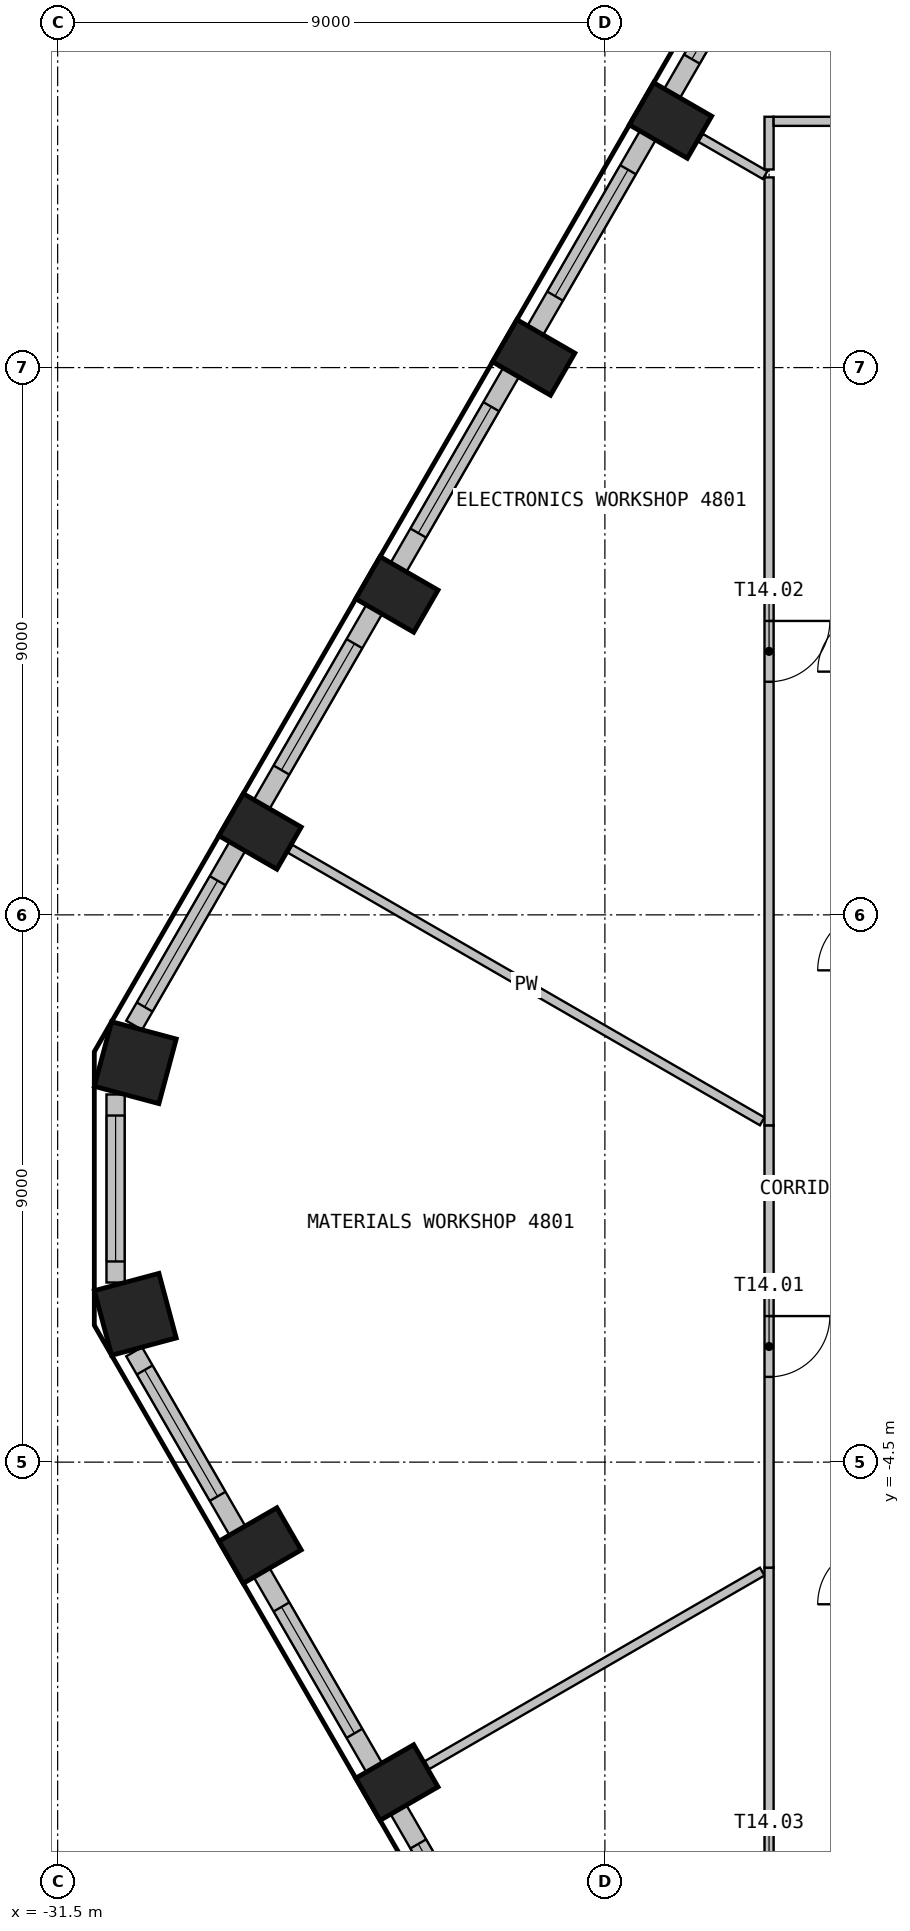
"""IFC4 building model, lengths in metres.
Left out: names, types, materials, properties, quantities, classifications, styles, units other than length and angle.
Written with IfcOpenShell. Run it as: python <this file> out.ifc"""

import sys

from ifc_helpers import new_model, si_unit, direction, frame, frame_2d, origin, origin_2d, place, context, subcontext, project, spatial, rectangle, extrude, element, fill, save


model = new_model("IFC4")
c1 = context("Model", 3, precision=1e-05, world=origin(), true_north=direction((0.0, 1.0)))
c2 = subcontext(c1, "Body", "Model", "MODEL_VIEW")
j1 = project(units=[si_unit("LENGTHUNIT", "METRE"), si_unit("PLANEANGLEUNIT", "RADIAN")], contexts=[c1])
p1 = place(None, origin())
s1 = spatial("IfcSite", under=j1, at=p1, CompositionType="ELEMENT")
p2 = place(p1, origin())
s2 = spatial("IfcBuilding", under=s1, at=p2, CompositionType="ELEMENT")
p3 = place(p2, frame((0.0, 0.0, 195.6)))
s3 = spatial("IfcBuildingStorey", under=s2, at=p3, CompositionType="ELEMENT", Elevation=195.6)
for number, where, z_axis, x_axis in (
    (1, (-21.421, 17.563, 0.0), (0.0, 0.0, 1.0), (-0.5, -0.866, 0.0)),
    (2, (-23.671, 13.666, 0.0), (0.0, 0.0, 1.0), (-0.5, -0.866, 0.0)),
    (3, (-25.921, 9.769, 0.0), (0.0, 0.0, 1.0), (-0.5, -0.866, 0.0)),
    (4, (-28.171, 5.872, 0.0), (0.0, 0.0, 1.0), (-0.5, -0.866, 0.0)),
):
    element("IfcColumn", number, at=place(p3, frame(where, z_axis=z_axis, x_axis=x_axis)), inside=s3, PredefinedType="COLUMN", context=c2, shape_type="SweptSolid", body=[
        extrude(rectangle(XDim=0.8, YDim=1.1, at=origin_2d()), origin(), (0.0, 0.0, 1.0), 3.55),
    ])
for number, where, z_axis, x_axis in (
    (5, (-30.223, 2.07, 0.0), (0.0, 0.0, 1.0), (-0.259, -0.966, 0.0)),
    (6, (-30.223, -2.07, 0.0), (0.0, 0.0, 1.0), (0.259, -0.966, 0.0)),
):
    element("IfcColumn", number, at=place(p3, frame(where, z_axis=z_axis, x_axis=x_axis)), inside=s3, PredefinedType="COLUMN", context=c2, shape_type="SweptSolid", body=[
        extrude(rectangle(XDim=1.1, YDim=1.1, at=origin_2d()), origin(), (0.0, 0.0, 1.0), 3.55),
    ])
for number, where, z_axis, x_axis in (
    (7, (-28.171, -5.872, 0.0), (0.0, 0.0, 1.0), (0.5, -0.866, 0.0)),
    (8, (-25.921, -9.769, 0.0), (0.0, 0.0, 1.0), (0.5, -0.866, 0.0)),
):
    element("IfcColumn", number, at=place(p3, frame(where, z_axis=z_axis, x_axis=x_axis)), inside=s3, PredefinedType="COLUMN", context=c2, shape_type="SweptSolid", body=[
        extrude(rectangle(XDim=0.8, YDim=1.1, at=origin_2d()), origin(), (0.0, 0.0, 1.0), 3.55),
    ])
p4 = place(p3, frame((-19.696, 20.951, 0.0), z_axis=(0.0, 0.0, 1.0), x_axis=(-0.500012868213, -0.866017974191, 0.0)))
e9 = element("IfcWall", 9, at=p4, inside=s3, PredefinedType="SOLIDWALL", context=c2, shape_type="SweptSolid", body=[
    extrude(rectangle(XDim=3.396, YDim=0.3, at=frame_2d((1.698, 0.0))), origin(), (0.0, 0.0, 1.0), 3.55),
])
p5 = place(p4, frame((0.346, 0.0, 0.9)))
e10 = element("IfcOpeningElement", 10, at=p5, cuts=e9, PredefinedType="OPENING", context=c2, shape_type="SweptSolid", body=[
    extrude(rectangle(XDim=2.4, YDim=2.1, at=frame_2d((1.2, 1.05))), frame((0.0, 0.16, 0.0), z_axis=(0.0, -1.0, 0.0), x_axis=(1.0, 0.0, 0.0)), (0.0, 0.0, 1.0), 0.32),
])
p6 = place(p3, frame((-21.794, 17.317, 0.0), z_axis=(0.0, 0.0, 1.0), x_axis=(-0.500029062817, -0.866008623709, 0.0)))
e11 = element("IfcWall", 11, at=p6, inside=s3, PredefinedType="SOLIDWALL", context=c2, shape_type="SweptSolid", body=[
    extrude(rectangle(XDim=3.699, YDim=0.3, at=frame_2d((1.85, 0.0))), origin(), (0.0, 0.0, 1.0), 3.55),
])
p7 = place(p6, frame((0.649, 0.0, 0.9)))
e12 = element("IfcOpeningElement", 12, at=p7, cuts=e11, PredefinedType="OPENING", context=c2, shape_type="SweptSolid", body=[
    extrude(rectangle(XDim=2.4, YDim=2.1, at=frame_2d((1.2, 1.05))), frame((0.0, 0.16, 0.0), z_axis=(0.0, -1.0, 0.0), x_axis=(1.0, 0.0, 0.0)), (0.0, 0.0, 1.0), 0.32),
])
p8 = place(p3, frame((-24.044, 13.419, 0.0), z_axis=(0.0, 0.0, 1.0), x_axis=(-0.500029062817, -0.866008623709, 0.0)))
e13 = element("IfcWall", 13, at=p8, inside=s3, PredefinedType="SOLIDWALL", context=c2, shape_type="SweptSolid", body=[
    extrude(rectangle(XDim=3.699, YDim=0.3, at=frame_2d((1.85, 0.0))), origin(), (0.0, 0.0, 1.0), 3.55),
])
p9 = place(p8, frame((0.649, 0.0, 0.9)))
e14 = element("IfcOpeningElement", 14, at=p9, cuts=e13, PredefinedType="OPENING", context=c2, shape_type="SweptSolid", body=[
    extrude(rectangle(XDim=2.4, YDim=2.1, at=frame_2d((1.2, 1.05))), frame((0.0, 0.16, 0.0), z_axis=(0.0, -1.0, 0.0), x_axis=(1.0, 0.0, 0.0)), (0.0, 0.0, 1.0), 0.32),
])
p10 = place(p3, frame((-26.294, 9.522, 0.0), z_axis=(0.0, 0.0, 1.0), x_axis=(-0.500029062817, -0.866008623709, 0.0)))
e15 = element("IfcWall", 15, at=p10, inside=s3, PredefinedType="SOLIDWALL", context=c2, shape_type="SweptSolid", body=[
    extrude(rectangle(XDim=3.699, YDim=0.3, at=frame_2d((1.85, 0.0))), origin(), (0.0, 0.0, 1.0), 3.55),
])
p11 = place(p10, frame((0.649, 0.0, 0.9)))
e16 = element("IfcOpeningElement", 16, at=p11, cuts=e15, PredefinedType="OPENING", context=c2, shape_type="SweptSolid", body=[
    extrude(rectangle(XDim=2.4, YDim=2.1, at=frame_2d((1.2, 1.05))), frame((0.0, 0.16, 0.0), z_axis=(0.0, -1.0, 0.0), x_axis=(1.0, 0.0, 0.0)), (0.0, 0.0, 1.0), 0.32),
])
p12 = place(p3, frame((-28.544, 5.625, 0.0), z_axis=(0.0, 0.0, 1.0), x_axis=(-0.500012868213, -0.866017974191, 0.0)))
e17 = element("IfcWall", 17, at=p12, inside=s3, PredefinedType="SOLIDWALL", context=c2, shape_type="SweptSolid", body=[
    extrude(rectangle(XDim=3.396, YDim=0.3, at=frame_2d((1.698, 0.0))), origin(), (0.0, 0.0, 1.0), 3.55),
])
p13 = place(p12, frame((0.649, 0.0, 0.9)))
e18 = element("IfcOpeningElement", 18, at=p13, cuts=e17, PredefinedType="OPENING", context=c2, shape_type="SweptSolid", body=[
    extrude(rectangle(XDim=2.4, YDim=2.1, at=frame_2d((1.2, 1.05))), frame((0.0, 0.16, 0.0), z_axis=(0.0, -1.0, 0.0), x_axis=(1.0, 0.0, 0.0)), (0.0, 0.0, 1.0), 0.32),
])
p14 = place(p3, frame((-30.547, 1.546, 0.0), z_axis=(0.0, 0.0, 1.0), x_axis=(0.0, -1.0, 0.0)))
e19 = element("IfcWall", 19, at=p14, inside=s3, PredefinedType="SOLIDWALL", context=c2, shape_type="SweptSolid", body=[
    extrude(rectangle(XDim=3.093, YDim=0.3, at=frame_2d((1.546, 0.0))), origin(), (0.0, 0.0, 1.0), 3.55),
])
p15 = place(p14, frame((0.346, 0.0, 0.9)))
e20 = element("IfcOpeningElement", 20, at=p15, cuts=e19, PredefinedType="OPENING", context=c2, shape_type="SweptSolid", body=[
    extrude(rectangle(XDim=2.4, YDim=2.1, at=frame_2d((1.2, 1.05))), frame((0.0, 0.16, 0.0), z_axis=(0.0, -1.0, 0.0), x_axis=(1.0, 0.0, 0.0)), (0.0, 0.0, 1.0), 0.32),
])
p16 = place(p3, frame((-30.242, -2.684, 0.0), z_axis=(0.0, 0.0, 1.0), x_axis=(0.500012868213, -0.866017974191, 0.0)))
e21 = element("IfcWall", 21, at=p16, inside=s3, PredefinedType="SOLIDWALL", context=c2, shape_type="SweptSolid", body=[
    extrude(rectangle(XDim=3.396, YDim=0.3, at=frame_2d((1.698, 0.0))), origin(), (0.0, 0.0, 1.0), 3.55),
])
p17 = place(p16, frame((0.346, 0.0, 0.9)))
e22 = element("IfcOpeningElement", 22, at=p17, cuts=e21, PredefinedType="OPENING", context=c2, shape_type="SweptSolid", body=[
    extrude(rectangle(XDim=2.4, YDim=2.1, at=frame_2d((1.2, 1.05))), frame((0.0, 0.16, 0.0), z_axis=(0.0, -1.0, 0.0), x_axis=(1.0, 0.0, 0.0)), (0.0, 0.0, 1.0), 0.32),
])
p18 = place(p3, frame((-28.144, -6.319, 0.0), z_axis=(0.0, 0.0, 1.0), x_axis=(0.500029062817, -0.866008623709, 0.0)))
e23 = element("IfcWall", 23, at=p18, inside=s3, PredefinedType="SOLIDWALL", context=c2, shape_type="SweptSolid", body=[
    extrude(rectangle(XDim=3.699, YDim=0.3, at=frame_2d((1.85, 0.0))), origin(), (0.0, 0.0, 1.0), 3.55),
])
p19 = place(p18, frame((0.649, 0.0, 0.9)))
e24 = element("IfcOpeningElement", 24, at=p19, cuts=e23, PredefinedType="OPENING", context=c2, shape_type="SweptSolid", body=[
    extrude(rectangle(XDim=2.4, YDim=2.1, at=frame_2d((1.2, 1.05))), frame((0.0, 0.16, 0.0), z_axis=(0.0, -1.0, 0.0), x_axis=(1.0, 0.0, 0.0)), (0.0, 0.0, 1.0), 0.32),
])
p20 = place(p3, frame((-25.894, -10.216, 0.0), z_axis=(0.0, 0.0, 1.0), x_axis=(0.500029062817, -0.866008623709, 0.0)))
e25 = element("IfcWall", 25, at=p20, inside=s3, PredefinedType="SOLIDWALL", context=c2, shape_type="SweptSolid", body=[
    extrude(rectangle(XDim=3.699, YDim=0.3, at=frame_2d((1.85, 0.0))), origin(), (0.0, 0.0, 1.0), 3.55),
])
p21 = place(p20, frame((0.649, 0.0, 0.9)))
e26 = element("IfcOpeningElement", 26, at=p21, cuts=e25, PredefinedType="OPENING", context=c2, shape_type="SweptSolid", body=[
    extrude(rectangle(XDim=2.4, YDim=2.1, at=frame_2d((1.2, 1.05))), frame((0.0, 0.16, 0.0), z_axis=(0.0, -1.0, 0.0), x_axis=(1.0, 0.0, 0.0)), (0.0, 0.0, 1.0), 0.32),
])
p22 = place(p3, frame((-27.677, 5.587, 0.0), z_axis=(0.0, 0.0, 1.0), x_axis=(0.866007370051, -0.500031234042, 0.0)))
e27 = element("IfcWall", 27, at=p22, inside=s3, PredefinedType="PARTITIONING", context=c2, shape_type="SweptSolid", body=[
    extrude(rectangle(XDim=8.966, YDim=0.15, at=frame_2d((4.483, 0.0))), origin(), (0.0, 0.0, 1.0), 3.55),
])
p23 = place(p3, frame((-19.913, -6.3, 0.0), z_axis=(0.0, 0.0, 1.0), x_axis=(-0.866011921086, -0.500023351992, 0.0)))
e28 = element("IfcWall", 28, at=p23, inside=s3, PredefinedType="PARTITIONING", context=c2, shape_type="SweptSolid", body=[
    extrude(rectangle(XDim=6.368, YDim=0.15, at=frame_2d((3.184, 0.0))), origin(), (0.0, 0.0, 1.0), 3.55),
])
p24 = place(p3, frame((-20.927, 17.278, 0.0), z_axis=(0.0, 0.0, 1.0), x_axis=(0.866202157257, -0.499693728962, 0.0)))
e29 = element("IfcWall", 29, at=p24, inside=s3, PredefinedType="PARTITIONING", context=c2, shape_type="SweptSolid", body=[
    extrude(rectangle(XDim=1.226, YDim=0.15, at=frame_2d((0.613, 0.0))), origin(), (0.0, 0.0, 1.0), 3.55),
])
p25 = place(p3, frame((-19.8, -6.235, 0.0), z_axis=(0.0, 0.0, 1.0), x_axis=(0.0, -1.0, 0.0)))
e30 = element("IfcWall", 30, at=p25, inside=s3, PredefinedType="PARTITIONING", context=c2, shape_type="SweptSolid", body=[
    extrude(rectangle(XDim=10.393, YDim=0.15, at=frame_2d((5.196, 0.0))), origin(), (0.0, 0.0, 1.0), 3.55),
])
p26 = place(p25, frame((4.697, 0.0, 0.0)))
e31 = element("IfcOpeningElement", 31, at=p26, cuts=e30, PredefinedType="OPENING", context=c2, shape_type="SweptSolid", body=[
    extrude(rectangle(XDim=1.0, YDim=2.1, at=frame_2d((0.5, 1.05))), frame((0.0, 0.085, 0.0), z_axis=(0.0, -1.0, 0.0), x_axis=(1.0, 0.0, 0.0)), (0.0, 0.0, 1.0), 0.17),
])
p27 = place(p3, frame((-19.8, 1.039, 0.0), z_axis=(0.0, 0.0, 1.0), x_axis=(0.0, -1.0, 0.0)))
e32 = element("IfcWall", 32, at=p27, inside=s3, PredefinedType="PARTITIONING", context=c2, shape_type="SweptSolid", body=[
    extrude(rectangle(XDim=7.274, YDim=0.15, at=frame_2d((3.637, 0.0))), origin(), (0.0, 0.0, 1.0), 3.55),
])
p28 = place(p27, frame((3.137, 0.0, 0.0)))
e33 = element("IfcOpeningElement", 33, at=p28, cuts=e32, PredefinedType="OPENING", context=c2, shape_type="SweptSolid", body=[
    extrude(rectangle(XDim=1.0, YDim=2.1, at=frame_2d((0.5, 1.05))), frame((0.0, 0.085, 0.0), z_axis=(0.0, -1.0, 0.0), x_axis=(1.0, 0.0, 0.0)), (0.0, 0.0, 1.0), 0.17),
])
p29 = place(p3, frame((-19.8, 16.628, 0.0), z_axis=(0.0, 0.0, 1.0), x_axis=(0.0, -1.0, 0.0)))
e34 = element("IfcWall", 34, at=p29, inside=s3, PredefinedType="PARTITIONING", context=c2, shape_type="SweptSolid", body=[
    extrude(rectangle(XDim=15.589, YDim=0.15, at=frame_2d((7.794, 0.0))), origin(), (0.0, 0.0, 1.0), 3.55),
])
p30 = place(p29, frame((7.294, 0.0, 0.0)))
e35 = element("IfcOpeningElement", 35, at=p30, cuts=e34, PredefinedType="OPENING", context=c2, shape_type="SweptSolid", body=[
    extrude(rectangle(XDim=1.0, YDim=2.1, at=frame_2d((0.5, 1.05))), frame((0.0, 0.085, 0.0), z_axis=(0.0, -1.0, 0.0), x_axis=(1.0, 0.0, 0.0)), (0.0, 0.0, 1.0), 0.17),
])
p31 = place(p3, frame((-19.8, 17.625, 0.0), z_axis=(0.0, 0.0, 1.0), x_axis=(0.0, -1.0, 0.0)))
e36 = element("IfcWall", 36, at=p31, inside=s3, PredefinedType="PARTITIONING", context=c2, shape_type="SweptSolid", body=[
    extrude(rectangle(XDim=0.867, YDim=0.15, at=frame_2d((0.434, 0.0))), origin(), (0.0, 0.0, 1.0), 3.55),
])
p32 = place(p3, frame((-6.75, 17.55, 0.0), z_axis=(0.0, 0.0, 1.0), x_axis=(-1.0, 0.0, 0.0)))
e37 = element("IfcWall", 37, at=p32, inside=s3, PredefinedType="PARTITIONING", context=c2, shape_type="SweptSolid", body=[
    extrude(rectangle(XDim=12.975, YDim=0.15, at=frame_2d((6.488, 0.0))), origin(), (0.0, 0.0, 1.0), 3.55),
])
p33 = place(p32, frame((5.988, 0.0, 0.0)))
e38 = element("IfcOpeningElement", 38, at=p33, cuts=e37, PredefinedType="OPENING", context=c2, shape_type="SweptSolid", body=[
    extrude(rectangle(XDim=1.0, YDim=2.1, at=frame_2d((0.5, 1.05))), frame((0.0, 0.085, 0.0), z_axis=(0.0, -1.0, 0.0), x_axis=(1.0, 0.0, 0.0)), (0.0, 0.0, 1.0), 0.17),
])
p34 = place(p5, origin())
e39 = element("IfcWindow", 39, at=p34, inside=s3, PartitioningType="SINGLE_PANEL", PredefinedType="WINDOW", context=c2, shape_type="SweptSolid", body=[
    extrude(rectangle(XDim=2.4, YDim=2.1, at=frame_2d((1.2, 1.05))), frame((0.0, 0.03, 0.0), z_axis=(0.0, -1.0, 0.0), x_axis=(1.0, 0.0, 0.0)), (0.0, 0.0, 1.0), 0.06),
])
fill(e10, e39)
p35 = place(p7, origin())
e40 = element("IfcWindow", 40, at=p35, inside=s3, PartitioningType="SINGLE_PANEL", PredefinedType="WINDOW", context=c2, shape_type="SweptSolid", body=[
    extrude(rectangle(XDim=2.4, YDim=2.1, at=frame_2d((1.2, 1.05))), frame((0.0, 0.03, 0.0), z_axis=(0.0, -1.0, 0.0), x_axis=(1.0, 0.0, 0.0)), (0.0, 0.0, 1.0), 0.06),
])
fill(e12, e40)
p36 = place(p9, origin())
e41 = element("IfcWindow", 41, at=p36, inside=s3, PartitioningType="SINGLE_PANEL", PredefinedType="WINDOW", context=c2, shape_type="SweptSolid", body=[
    extrude(rectangle(XDim=2.4, YDim=2.1, at=frame_2d((1.2, 1.05))), frame((0.0, 0.03, 0.0), z_axis=(0.0, -1.0, 0.0), x_axis=(1.0, 0.0, 0.0)), (0.0, 0.0, 1.0), 0.06),
])
fill(e14, e41)
p37 = place(p11, origin())
e42 = element("IfcWindow", 42, at=p37, inside=s3, PartitioningType="SINGLE_PANEL", PredefinedType="WINDOW", context=c2, shape_type="SweptSolid", body=[
    extrude(rectangle(XDim=2.4, YDim=2.1, at=frame_2d((1.2, 1.05))), frame((0.0, 0.03, 0.0), z_axis=(0.0, -1.0, 0.0), x_axis=(1.0, 0.0, 0.0)), (0.0, 0.0, 1.0), 0.06),
])
fill(e16, e42)
p38 = place(p13, origin())
e43 = element("IfcWindow", 43, at=p38, inside=s3, PartitioningType="SINGLE_PANEL", PredefinedType="WINDOW", context=c2, shape_type="SweptSolid", body=[
    extrude(rectangle(XDim=2.4, YDim=2.1, at=frame_2d((1.2, 1.05))), frame((0.0, 0.03, 0.0), z_axis=(0.0, -1.0, 0.0), x_axis=(1.0, 0.0, 0.0)), (0.0, 0.0, 1.0), 0.06),
])
fill(e18, e43)
p39 = place(p15, origin())
e44 = element("IfcWindow", 44, at=p39, inside=s3, PartitioningType="SINGLE_PANEL", PredefinedType="WINDOW", context=c2, shape_type="SweptSolid", body=[
    extrude(rectangle(XDim=2.4, YDim=2.1, at=frame_2d((1.2, 1.05))), frame((0.0, 0.03, 0.0), z_axis=(0.0, -1.0, 0.0), x_axis=(1.0, 0.0, 0.0)), (0.0, 0.0, 1.0), 0.06),
])
fill(e20, e44)
p40 = place(p17, origin())
e45 = element("IfcWindow", 45, at=p40, inside=s3, PartitioningType="SINGLE_PANEL", PredefinedType="WINDOW", context=c2, shape_type="SweptSolid", body=[
    extrude(rectangle(XDim=2.4, YDim=2.1, at=frame_2d((1.2, 1.05))), frame((0.0, 0.03, 0.0), z_axis=(0.0, -1.0, 0.0), x_axis=(1.0, 0.0, 0.0)), (0.0, 0.0, 1.0), 0.06),
])
fill(e22, e45)
p41 = place(p19, origin())
e46 = element("IfcWindow", 46, at=p41, inside=s3, PartitioningType="SINGLE_PANEL", PredefinedType="WINDOW", context=c2, shape_type="SweptSolid", body=[
    extrude(rectangle(XDim=2.4, YDim=2.1, at=frame_2d((1.2, 1.05))), frame((0.0, 0.03, 0.0), z_axis=(0.0, -1.0, 0.0), x_axis=(1.0, 0.0, 0.0)), (0.0, 0.0, 1.0), 0.06),
])
fill(e24, e46)
p42 = place(p21, origin())
e47 = element("IfcWindow", 47, at=p42, inside=s3, PartitioningType="SINGLE_PANEL", PredefinedType="WINDOW", context=c2, shape_type="SweptSolid", body=[
    extrude(rectangle(XDim=2.4, YDim=2.1, at=frame_2d((1.2, 1.05))), frame((0.0, 0.03, 0.0), z_axis=(0.0, -1.0, 0.0), x_axis=(1.0, 0.0, 0.0)), (0.0, 0.0, 1.0), 0.06),
])
fill(e26, e47)
p43 = place(p28, origin())
e48 = element("IfcDoor", 48, at=p43, inside=s3, OperationType="SINGLE_SWING_RIGHT", PredefinedType="DOOR", context=c2, shape_type="SweptSolid", body=[
    extrude(rectangle(XDim=1.0, YDim=2.1, at=frame_2d((0.5, 1.05))), frame((0.0, 0.025, 0.0), z_axis=(0.0, -1.0, 0.0), x_axis=(1.0, 0.0, 0.0)), (0.0, 0.0, 1.0), 0.05),
])
fill(e33, e48)
p44 = place(p30, origin())
e49 = element("IfcDoor", 49, at=p44, inside=s3, OperationType="SINGLE_SWING_RIGHT", PredefinedType="DOOR", context=c2, shape_type="SweptSolid", body=[
    extrude(rectangle(XDim=1.0, YDim=2.1, at=frame_2d((0.5, 1.05))), frame((0.0, 0.025, 0.0), z_axis=(0.0, -1.0, 0.0), x_axis=(1.0, 0.0, 0.0)), (0.0, 0.0, 1.0), 0.05),
])
fill(e35, e49)
save(model, sys.argv[1])
